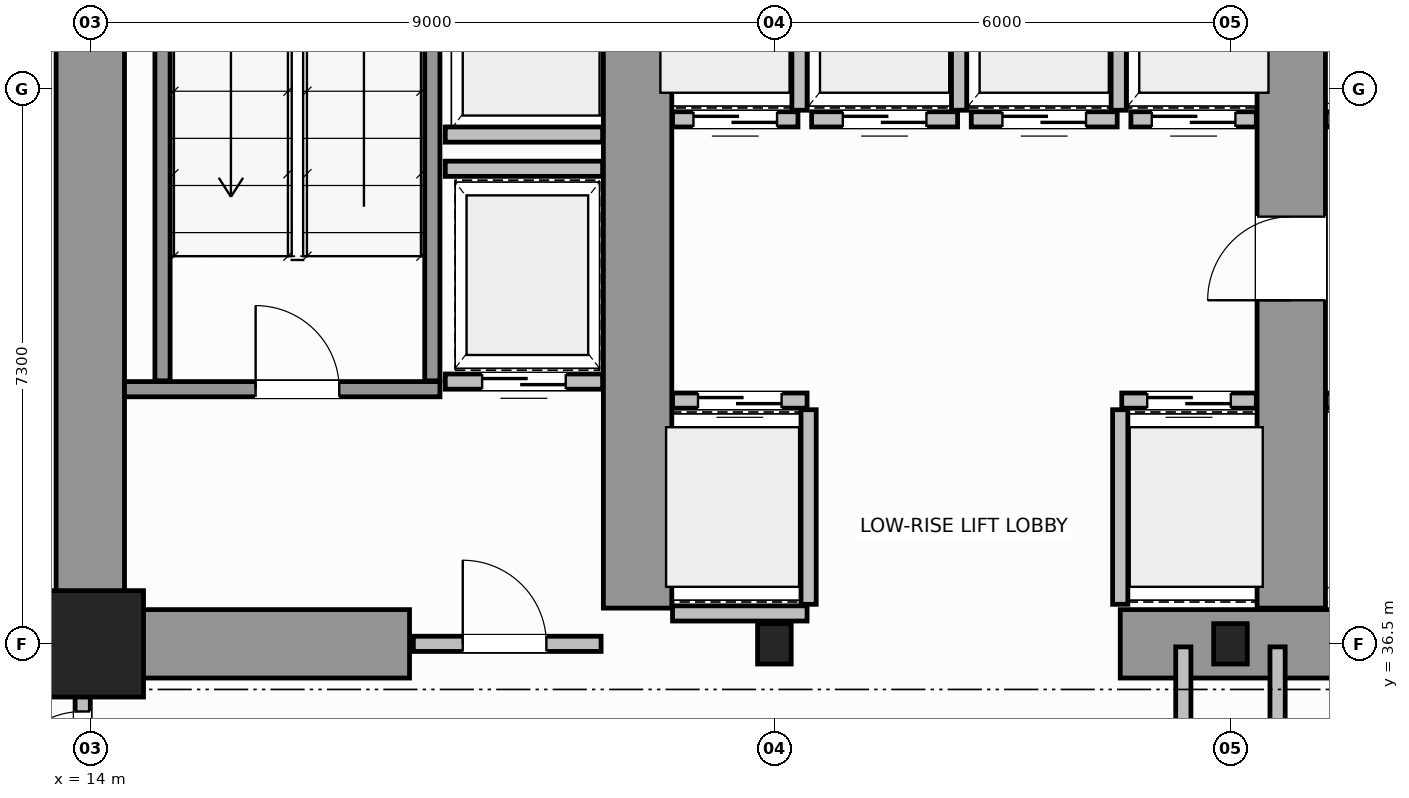
"""IFC4 building model, lengths in metres.
Left out: names, types, materials, properties, quantities, classifications, styles, units other than length and angle.
Written with IfcOpenShell. Run it as: python <this file> out.ifc"""

import sys

from ifc_helpers import new_model, si_unit, direction, frame, frame_2d, origin, origin_2d, place, context, subcontext, project, spatial, rectangle, i_section, extrude, source, transform, mapped, element, fill, save


model = new_model("IFC4")
c1 = context("Model", 3, precision=1e-05, world=origin(), true_north=direction((0.0, 1.0)))
c2 = subcontext(c1, "Body", "Model", "MODEL_VIEW")
j1 = project(units=[si_unit("LENGTHUNIT", "METRE"), si_unit("PLANEANGLEUNIT", "RADIAN")], contexts=[c1])
p1 = place(None, origin())
s1 = spatial("IfcSite", under=j1, at=p1, CompositionType="ELEMENT")
p2 = place(p1, origin())
s2 = spatial("IfcBuilding", under=s1, at=p2, CompositionType="ELEMENT")
p3 = place(p2, frame((0.0, 0.0, 83.4)))
s3 = spatial("IfcBuildingStorey", under=s2, at=p3, CompositionType="ELEMENT", Elevation=83.4)
m1 = source(origin(), c2, "Body", "SweptSolid", [
    extrude(rectangle(XDim=1.4, YDim=1.4, at=origin_2d()), origin(), (0.0, 0.0, 1.0), 4.8),
])
p4 = place(p3, frame((14.0, 36.5, 0.0), z_axis=(0.0, 0.0, 1.0), x_axis=(1.0, 0.0, 0.0)))
e1 = element("IfcColumn", 1, at=p4, inside=s3, PredefinedType="COLUMN", context=c2, shape_type="MappedRepresentation", body=[
    mapped(m1, transform((0.0, 0.0, 0.0), scale=1.0)),
])
m2 = source(origin(), c2, "Body", "SweptSolid", [
    extrude(i_section(OverallWidth=0.442, OverallDepth=0.531, WebThickness=0.065, FlangeThickness=0.076, FilletRadius=0.015, at=origin_2d()), origin(), (0.0, 0.0, 1.0), 4.8),
])
for number, where, z_axis, x_axis in (
    (2, (23.0, 36.5, 0.0), (0.0, 0.0, 1.0), (1.0, 0.0, 0.0)),
    (3, (29.0, 36.5, 0.0), (0.0, 0.0, 1.0), (1.0, 0.0, 0.0)),
):
    element("IfcColumn", number, at=place(p3, frame(where, z_axis=z_axis, x_axis=x_axis)), inside=s3, PredefinedType="COLUMN", context=c2, shape_type="MappedRepresentation", body=[
        mapped(m2, transform((0.0, 0.0, 0.0), scale=1.0)),
    ])
p5 = place(p3, frame((14.0, 36.5, 0.0), z_axis=(0.0, 0.0, 1.0), x_axis=(0.0, 1.0, 0.0)))
e4 = element("IfcWall", 4, at=p5, inside=s3, PredefinedType="SHEAR", context=c2, shape_type="SweptSolid", body=[
    extrude(rectangle(XDim=14.5, YDim=0.9, at=frame_2d((7.25, 0.0))), origin(), (0.0, 0.0, 1.0), 4.8),
])
p6 = place(p3, frame((14.47, 36.5, 0.0), z_axis=(0.0, 0.0, 1.0), x_axis=(1.0, 0.0, 0.0)))
e5 = element("IfcWall", 5, at=p6, inside=s3, PredefinedType="SHEAR", context=c2, shape_type="SweptSolid", body=[
    extrude(rectangle(XDim=3.73, YDim=0.9, at=frame_2d((1.865, 0.0))), origin(), (0.0, 0.0, 1.0), 3.34),
])
p7 = place(p3, frame((27.55, 36.5, 0.0), z_axis=(0.0, 0.0, 1.0), x_axis=(1.0, 0.0, 0.0)))
e6 = element("IfcWall", 6, at=p7, inside=s3, PredefinedType="SHEAR", context=c2, shape_type="SweptSolid", body=[
    extrude(rectangle(XDim=4.5, YDim=0.9, at=frame_2d((2.25, 0.0))), origin(), (0.0, 0.0, 1.0), 4.8),
])
p8 = place(p3, frame((21.2, 36.97, 0.0), z_axis=(0.0, 0.0, 1.0), x_axis=(0.0, 1.0, 0.0)))
e7 = element("IfcWall", 7, at=p8, inside=s3, PredefinedType="SHEAR", context=c2, shape_type="SweptSolid", body=[
    extrude(rectangle(XDim=9.23, YDim=0.9, at=frame_2d((4.615, 0.0))), origin(), (0.0, 0.0, 1.0), 4.8),
])
p9 = place(p3, frame((29.8, 36.97, 0.0), z_axis=(0.0, 0.0, 1.0), x_axis=(0.0, 1.0, 0.0)))
e8 = element("IfcWall", 8, at=p9, inside=s3, PredefinedType="SHEAR", context=c2, shape_type="SweptSolid", body=[
    extrude(rectangle(XDim=9.23, YDim=0.9, at=frame_2d((4.615, 0.0))), origin(), (0.0, 0.0, 1.0), 4.8),
])
p10 = place(p9, frame((4.05, 0.0, 0.0)))
e9 = element("IfcOpeningElement", 9, at=p10, cuts=e8, PredefinedType="OPENING", context=c2, shape_type="SweptSolid", body=[
    extrude(rectangle(XDim=1.1, YDim=2.15, at=frame_2d((0.55, 1.075))), frame((0.0, 0.46, 0.0), z_axis=(0.0, -1.0, 0.0), x_axis=(1.0, 0.0, 0.0)), (0.0, 0.0, 1.0), 0.92),
])
p11 = place(p3, frame((14.45, 39.85, 0.0), z_axis=(0.0, 0.0, 1.0), x_axis=(1.0, 0.0, 0.0)))
e10 = element("IfcWall", 10, at=p11, inside=s3, PredefinedType="SOLIDWALL", context=c2, shape_type="SweptSolid", body=[
    extrude(rectangle(XDim=4.15, YDim=0.2, at=frame_2d((2.075, 0.0))), origin(), (0.0, 0.0, 1.0), 4.8),
])
p12 = place(p11, frame((1.725, 0.0, 0.0)))
e11 = element("IfcOpeningElement", 11, at=p12, cuts=e10, PredefinedType="OPENING", context=c2, shape_type="SweptSolid", body=[
    extrude(rectangle(XDim=1.1, YDim=2.15, at=frame_2d((0.55, 1.075))), frame((0.0, 0.11, 0.0), z_axis=(0.0, -1.0, 0.0), x_axis=(1.0, 0.0, 0.0)), (0.0, 0.0, 1.0), 0.22),
])
for number, where, z_axis, x_axis in (
    (12, (14.95, 39.96, 0.0), (0.0, 0.0, 1.0), (0.0, 1.0, 0.0)),
    (13, (18.5, 39.96, 0.0), (0.0, 0.0, 1.0), (0.0, 1.0, 0.0)),
):
    element("IfcWall", number, at=place(p3, frame(where, z_axis=z_axis, x_axis=x_axis)), inside=s3, PredefinedType="SOLIDWALL", context=c2, shape_type="SweptSolid", body=[
        extrude(rectangle(XDim=9.93, YDim=0.2, at=frame_2d((4.965, 0.0))), origin(), (0.0, 0.0, 1.0), 4.8),
    ])
p13 = place(p3, frame((18.25, 36.5, 0.0), z_axis=(0.0, 0.0, 1.0), x_axis=(1.0, 0.0, 0.0)))
e14 = element("IfcWall", 14, at=p13, inside=s3, PredefinedType="SOLIDWALL", context=c2, shape_type="SweptSolid", body=[
    extrude(rectangle(XDim=2.47, YDim=0.2, at=frame_2d((1.235, 0.0))), origin(), (0.0, 0.0, 1.0), 3.33),
])
p14 = place(p13, frame((0.65, 0.0, 0.0)))
e15 = element("IfcOpeningElement", 15, at=p14, cuts=e14, PredefinedType="OPENING", context=c2, shape_type="SweptSolid", body=[
    extrude(rectangle(XDim=1.1, YDim=2.15, at=frame_2d((0.55, 1.075))), frame((0.0, 0.11, 0.0), z_axis=(0.0, -1.0, 0.0), x_axis=(1.0, 0.0, 0.0)), (0.0, 0.0, 1.0), 0.22),
])
p15 = place(p3, frame((21.66, 39.7, 0.0), z_axis=(0.0, 0.0, 1.0), x_axis=(1.0, 0.0, 0.0)))
e16 = element("IfcWall", 16, at=p15, inside=s3, PredefinedType="SOLIDWALL", context=c2, shape_type="SweptSolid", body=[
    extrude(rectangle(XDim=1.77, YDim=0.2, at=frame_2d((0.885, 0.0))), origin(), (0.0, 0.0, 1.0), 4.54),
])
p16 = place(p15, frame((0.335, 0.0, 0.0)))
e17 = element("IfcOpeningElement", 17, at=p16, cuts=e16, PredefinedType="OPENING", context=c2, shape_type="SweptSolid", body=[
    extrude(rectangle(XDim=1.1, YDim=2.15, at=frame_2d((0.55, 1.075))), frame((0.0, 0.11, 0.0), z_axis=(0.0, -1.0, 0.0), x_axis=(1.0, 0.0, 0.0)), (0.0, 0.0, 1.0), 0.22),
])
p17 = place(p3, frame((21.66, 36.9, 0.0), z_axis=(0.0, 0.0, 1.0), x_axis=(1.0, 0.0, 0.0)))
e18 = element("IfcWall", 18, at=p17, inside=s3, PredefinedType="SOLIDWALL", context=c2, shape_type="SweptSolid", body=[
    extrude(rectangle(XDim=1.77, YDim=0.2, at=frame_2d((0.885, 0.0))), origin(), (0.0, 0.0, 1.0), 3.33),
])
p18 = place(p3, frame((23.45, 37.02, 0.0), z_axis=(0.0, 0.0, 1.0), x_axis=(0.0, 1.0, 0.0)))
e19 = element("IfcWall", 19, at=p18, inside=s3, PredefinedType="SOLIDWALL", context=c2, shape_type="SweptSolid", body=[
    extrude(rectangle(XDim=2.56, YDim=0.2, at=frame_2d((1.28, 0.0))), origin(), (0.0, 0.0, 1.0), 4.54),
])
p19 = place(p3, frame((27.57, 39.7, 0.0), z_axis=(0.0, 0.0, 1.0), x_axis=(1.0, 0.0, 0.0)))
e20 = element("IfcWall", 20, at=p19, inside=s3, PredefinedType="SOLIDWALL", context=c2, shape_type="SweptSolid", body=[
    extrude(rectangle(XDim=1.77, YDim=0.2, at=frame_2d((0.885, 0.0))), origin(), (0.0, 0.0, 1.0), 4.54),
])
p20 = place(p19, frame((0.335, 0.0, 0.0)))
e21 = element("IfcOpeningElement", 21, at=p20, cuts=e20, PredefinedType="OPENING", context=c2, shape_type="SweptSolid", body=[
    extrude(rectangle(XDim=1.1, YDim=2.15, at=frame_2d((0.55, 1.075))), frame((0.0, 0.11, 0.0), z_axis=(0.0, -1.0, 0.0), x_axis=(1.0, 0.0, 0.0)), (0.0, 0.0, 1.0), 0.22),
])
p21 = place(p3, frame((27.55, 37.02, 0.0), z_axis=(0.0, 0.0, 1.0), x_axis=(0.0, 1.0, 0.0)))
e22 = element("IfcWall", 22, at=p21, inside=s3, PredefinedType="SOLIDWALL", context=c2, shape_type="SweptSolid", body=[
    extrude(rectangle(XDim=2.56, YDim=0.2, at=frame_2d((1.28, 0.0))), origin(), (0.0, 0.0, 1.0), 4.54),
])
p22 = place(p3, frame((21.66, 43.4, 0.0), z_axis=(0.0, 0.0, 1.0), x_axis=(1.0, 0.0, 0.0)))
e23 = element("IfcWall", 23, at=p22, inside=s3, PredefinedType="SOLIDWALL", context=c2, shape_type="SweptSolid", body=[
    extrude(rectangle(XDim=1.65, YDim=0.2, at=frame_2d((0.825, 0.0))), origin(), (0.0, 0.0, 1.0), 4.54),
])
p23 = place(p22, frame((0.275, 0.0, 0.0)))
e24 = element("IfcOpeningElement", 24, at=p23, cuts=e23, PredefinedType="OPENING", context=c2, shape_type="SweptSolid", body=[
    extrude(rectangle(XDim=1.1, YDim=2.15, at=frame_2d((0.55, 1.075))), frame((0.0, 0.11, 0.0), z_axis=(0.0, -1.0, 0.0), x_axis=(1.0, 0.0, 0.0)), (0.0, 0.0, 1.0), 0.22),
])
p24 = place(p3, frame((23.33, 43.52, 0.0), z_axis=(0.0, 0.0, 1.0), x_axis=(0.0, 1.0, 0.0)))
e25 = element("IfcWall", 25, at=p24, inside=s3, PredefinedType="SOLIDWALL", context=c2, shape_type="SweptSolid", body=[
    extrude(rectangle(XDim=2.56, YDim=0.2, at=frame_2d((1.28, 0.0))), origin(), (0.0, 0.0, 1.0), 4.54),
])
p25 = place(p3, frame((23.49, 43.4, 0.0), z_axis=(0.0, 0.0, 1.0), x_axis=(1.0, 0.0, 0.0)))
e26 = element("IfcWall", 26, at=p25, inside=s3, PredefinedType="SOLIDWALL", context=c2, shape_type="SweptSolid", body=[
    extrude(rectangle(XDim=1.92, YDim=0.2, at=frame_2d((0.96, 0.0))), origin(), (0.0, 0.0, 1.0), 4.54),
])
p26 = place(p25, frame((0.41, 0.0, 0.0)))
e27 = element("IfcOpeningElement", 27, at=p26, cuts=e26, PredefinedType="OPENING", context=c2, shape_type="SweptSolid", body=[
    extrude(rectangle(XDim=1.1, YDim=2.15, at=frame_2d((0.55, 1.075))), frame((0.0, 0.11, 0.0), z_axis=(0.0, -1.0, 0.0), x_axis=(1.0, 0.0, 0.0)), (0.0, 0.0, 1.0), 0.22),
])
p27 = place(p3, frame((25.43, 43.52, 0.0), z_axis=(0.0, 0.0, 1.0), x_axis=(0.0, 1.0, 0.0)))
e28 = element("IfcWall", 28, at=p27, inside=s3, PredefinedType="SOLIDWALL", context=c2, shape_type="SweptSolid", body=[
    extrude(rectangle(XDim=2.56, YDim=0.2, at=frame_2d((1.28, 0.0))), origin(), (0.0, 0.0, 1.0), 4.54),
])
p28 = place(p3, frame((25.59, 43.4, 0.0), z_axis=(0.0, 0.0, 1.0), x_axis=(1.0, 0.0, 0.0)))
e29 = element("IfcWall", 29, at=p28, inside=s3, PredefinedType="SOLIDWALL", context=c2, shape_type="SweptSolid", body=[
    extrude(rectangle(XDim=1.92, YDim=0.2, at=frame_2d((0.96, 0.0))), origin(), (0.0, 0.0, 1.0), 4.54),
])
p29 = place(p28, frame((0.41, 0.0, 0.0)))
e30 = element("IfcOpeningElement", 30, at=p29, cuts=e29, PredefinedType="OPENING", context=c2, shape_type="SweptSolid", body=[
    extrude(rectangle(XDim=1.1, YDim=2.15, at=frame_2d((0.55, 1.075))), frame((0.0, 0.11, 0.0), z_axis=(0.0, -1.0, 0.0), x_axis=(1.0, 0.0, 0.0)), (0.0, 0.0, 1.0), 0.22),
])
p30 = place(p3, frame((27.53, 43.52, 0.0), z_axis=(0.0, 0.0, 1.0), x_axis=(0.0, 1.0, 0.0)))
e31 = element("IfcWall", 31, at=p30, inside=s3, PredefinedType="SOLIDWALL", context=c2, shape_type="SweptSolid", body=[
    extrude(rectangle(XDim=2.56, YDim=0.2, at=frame_2d((1.28, 0.0))), origin(), (0.0, 0.0, 1.0), 4.54),
])
p31 = place(p3, frame((27.69, 43.4, 0.0), z_axis=(0.0, 0.0, 1.0), x_axis=(1.0, 0.0, 0.0)))
e32 = element("IfcWall", 32, at=p31, inside=s3, PredefinedType="SOLIDWALL", context=c2, shape_type="SweptSolid", body=[
    extrude(rectangle(XDim=1.65, YDim=0.2, at=frame_2d((0.825, 0.0))), origin(), (0.0, 0.0, 1.0), 4.54),
])
p32 = place(p31, frame((0.275, 0.0, 0.0)))
e33 = element("IfcOpeningElement", 33, at=p32, cuts=e32, PredefinedType="OPENING", context=c2, shape_type="SweptSolid", body=[
    extrude(rectangle(XDim=1.1, YDim=2.15, at=frame_2d((0.55, 1.075))), frame((0.0, 0.11, 0.0), z_axis=(0.0, -1.0, 0.0), x_axis=(1.0, 0.0, 0.0)), (0.0, 0.0, 1.0), 0.22),
])
p33 = place(p3, frame((30.26, 39.7, 0.0), z_axis=(0.0, 0.0, 1.0), x_axis=(1.0, 0.0, 0.0)))
e34 = element("IfcWall", 34, at=p33, inside=s3, PredefinedType="SOLIDWALL", context=c2, shape_type="SweptSolid", body=[
    extrude(rectangle(XDim=1.77, YDim=0.2, at=frame_2d((0.885, 0.0))), origin(), (0.0, 0.0, 1.0), 4.54),
])
p34 = place(p3, frame((30.26, 43.4, 0.0), z_axis=(0.0, 0.0, 1.0), x_axis=(1.0, 0.0, 0.0)))
e35 = element("IfcWall", 35, at=p34, inside=s3, PredefinedType="SOLIDWALL", context=c2, shape_type="SweptSolid", body=[
    extrude(rectangle(XDim=1.65, YDim=0.2, at=frame_2d((0.825, 0.0))), origin(), (0.0, 0.0, 1.0), 4.54),
])
p35 = place(p3, frame((18.67, 43.2, 0.0), z_axis=(0.0, 0.0, 1.0), x_axis=(1.0, 0.0, 0.0)))
e36 = element("IfcWall", 36, at=p35, inside=s3, PredefinedType="SOLIDWALL", context=c2, shape_type="SweptSolid", body=[
    extrude(rectangle(XDim=2.07, YDim=0.2, at=frame_2d((1.035, 0.0))), origin(), (0.0, 0.0, 1.0), 4.54),
])
p36 = place(p3, frame((18.67, 39.95, 0.0), z_axis=(0.0, 0.0, 1.0), x_axis=(1.0, 0.0, 0.0)))
e37 = element("IfcWall", 37, at=p36, inside=s3, PredefinedType="SOLIDWALL", context=c2, shape_type="SweptSolid", body=[
    extrude(rectangle(XDim=2.07, YDim=0.2, at=frame_2d((1.035, 0.0))), origin(), (0.0, 0.0, 1.0), 4.54),
])
p37 = place(p36, frame((0.485, 0.0, 0.0)))
e38 = element("IfcOpeningElement", 38, at=p37, cuts=e37, PredefinedType="OPENING", context=c2, shape_type="SweptSolid", body=[
    extrude(rectangle(XDim=1.1, YDim=2.15, at=frame_2d((0.55, 1.075))), frame((0.0, 0.11, 0.0), z_axis=(0.0, -1.0, 0.0), x_axis=(1.0, 0.0, 0.0)), (0.0, 0.0, 1.0), 0.22),
])
p38 = place(p3, frame((18.67, 42.75, 0.0), z_axis=(0.0, 0.0, 1.0), x_axis=(1.0, 0.0, 0.0)))
e39 = element("IfcWall", 39, at=p38, inside=s3, PredefinedType="SOLIDWALL", context=c2, shape_type="SweptSolid", body=[
    extrude(rectangle(XDim=2.07, YDim=0.2, at=frame_2d((1.035, 0.0))), origin(), (0.0, 0.0, 1.0), 4.54),
])
p39 = place(p3, frame((13.9, 33.86, 0.0), z_axis=(0.0, 0.0, 1.0), x_axis=(0.0, 1.0, 0.0)))
e40 = element("IfcWall", 40, at=p39, inside=s3, PredefinedType="SOLIDWALL", context=c2, shape_type="SweptSolid", body=[
    extrude(rectangle(XDim=2.58, YDim=0.2, at=frame_2d((1.29, 0.0))), origin(), (0.0, 0.0, 1.0), 4.54),
])
p40 = place(p39, frame((0.65, 0.0, 0.0)))
e41 = element("IfcOpeningElement", 41, at=p40, cuts=e40, PredefinedType="OPENING", context=c2, shape_type="SweptSolid", body=[
    extrude(rectangle(XDim=1.1, YDim=2.15, at=frame_2d((0.55, 1.075))), frame((0.0, 0.11, 0.0), z_axis=(0.0, -1.0, 0.0), x_axis=(1.0, 0.0, 0.0)), (0.0, 0.0, 1.0), 0.22),
])
for number, where, z_axis, x_axis in (
    (42, (28.38, 28.16, 0.0), (0.0, 0.0, 1.0), (0.0, 1.0, 0.0)),
    (43, (29.62, 28.16, 0.0), (0.0, 0.0, 1.0), (0.0, 1.0, 0.0)),
):
    element("IfcWall", number, at=place(p3, frame(where, z_axis=z_axis, x_axis=x_axis)), inside=s3, PredefinedType="SOLIDWALL", context=c2, shape_type="SweptSolid", body=[
        extrude(rectangle(XDim=8.3, YDim=0.2, at=frame_2d((4.15, 0.0))), origin(), (0.0, 0.0, 1.0), 4.54),
    ])
m3 = source(origin(), c2, "Body", "SweptSolid", [
    extrude(rectangle(XDim=1.1, YDim=2.15, at=frame_2d((0.55, 1.075))), frame((0.0, 0.025, 0.0), z_axis=(0.0, -1.0, 0.0), x_axis=(1.0, 0.0, 0.0)), (0.0, 0.0, 1.0), 0.05),
])
p41 = place(p12, origin())
e44 = element("IfcDoor", 44, at=p41, inside=s3, OperationType="SINGLE_SWING_LEFT", PredefinedType="DOOR", context=c2, shape_type="MappedRepresentation", body=[
    mapped(m3, transform((0.0, 0.0, 0.0), scale=1.0)),
])
fill(e11, e44)
p42 = place(p14, origin())
e45 = element("IfcDoor", 45, at=p42, inside=s3, OperationType="SINGLE_SWING_RIGHT", PredefinedType="DOOR", context=c2, shape_type="MappedRepresentation", body=[
    mapped(m3, transform((0.0, 0.0, 0.0), scale=1.0)),
])
fill(e15, e45)
p43 = place(p16, origin())
e46 = element("IfcDoor", 46, at=p43, inside=s3, OperationType="DOUBLE_DOOR_SLIDING", PredefinedType="DOOR", context=c2, shape_type="MappedRepresentation", body=[
    mapped(m3, transform((0.0, 0.0, 0.0), scale=1.0)),
])
fill(e17, e46)
p44 = place(p20, origin())
e47 = element("IfcDoor", 47, at=p44, inside=s3, OperationType="DOUBLE_DOOR_SLIDING", PredefinedType="DOOR", context=c2, shape_type="MappedRepresentation", body=[
    mapped(m3, transform((0.0, 0.0, 0.0), scale=1.0)),
])
fill(e21, e47)
p45 = place(p23, origin())
e48 = element("IfcDoor", 48, at=p45, inside=s3, OperationType="DOUBLE_DOOR_SLIDING", PredefinedType="DOOR", context=c2, shape_type="MappedRepresentation", body=[
    mapped(m3, transform((0.0, 0.0, 0.0), scale=1.0)),
])
fill(e24, e48)
p46 = place(p26, origin())
e49 = element("IfcDoor", 49, at=p46, inside=s3, OperationType="DOUBLE_DOOR_SLIDING", PredefinedType="DOOR", context=c2, shape_type="MappedRepresentation", body=[
    mapped(m3, transform((0.0, 0.0, 0.0), scale=1.0)),
])
fill(e27, e49)
p47 = place(p29, origin())
e50 = element("IfcDoor", 50, at=p47, inside=s3, OperationType="DOUBLE_DOOR_SLIDING", PredefinedType="DOOR", context=c2, shape_type="MappedRepresentation", body=[
    mapped(m3, transform((0.0, 0.0, 0.0), scale=1.0)),
])
fill(e30, e50)
p48 = place(p32, origin())
e51 = element("IfcDoor", 51, at=p48, inside=s3, OperationType="DOUBLE_DOOR_SLIDING", PredefinedType="DOOR", context=c2, shape_type="MappedRepresentation", body=[
    mapped(m3, transform((0.0, 0.0, 0.0), scale=1.0)),
])
fill(e33, e51)
p49 = place(p37, origin())
e52 = element("IfcDoor", 52, at=p49, inside=s3, OperationType="DOUBLE_DOOR_SLIDING", PredefinedType="DOOR", context=c2, shape_type="MappedRepresentation", body=[
    mapped(m3, transform((0.0, 0.0, 0.0), scale=1.0)),
])
fill(e38, e52)
p50 = place(p10, origin())
e53 = element("IfcDoor", 53, at=p50, inside=s3, OperationType="SINGLE_SWING_LEFT", PredefinedType="DOOR", context=c2, shape_type="MappedRepresentation", body=[
    mapped(m3, transform((0.0, 0.0, 0.0), scale=1.0)),
])
fill(e9, e53)
p51 = place(p40, origin())
e54 = element("IfcDoor", 54, at=p51, inside=s3, OperationType="SINGLE_SWING_LEFT", PredefinedType="DOOR", context=c2, shape_type="MappedRepresentation", body=[
    mapped(m3, transform((0.0, 0.0, 0.0), scale=1.0)),
])
fill(e41, e54)
save(model, sys.argv[1])
